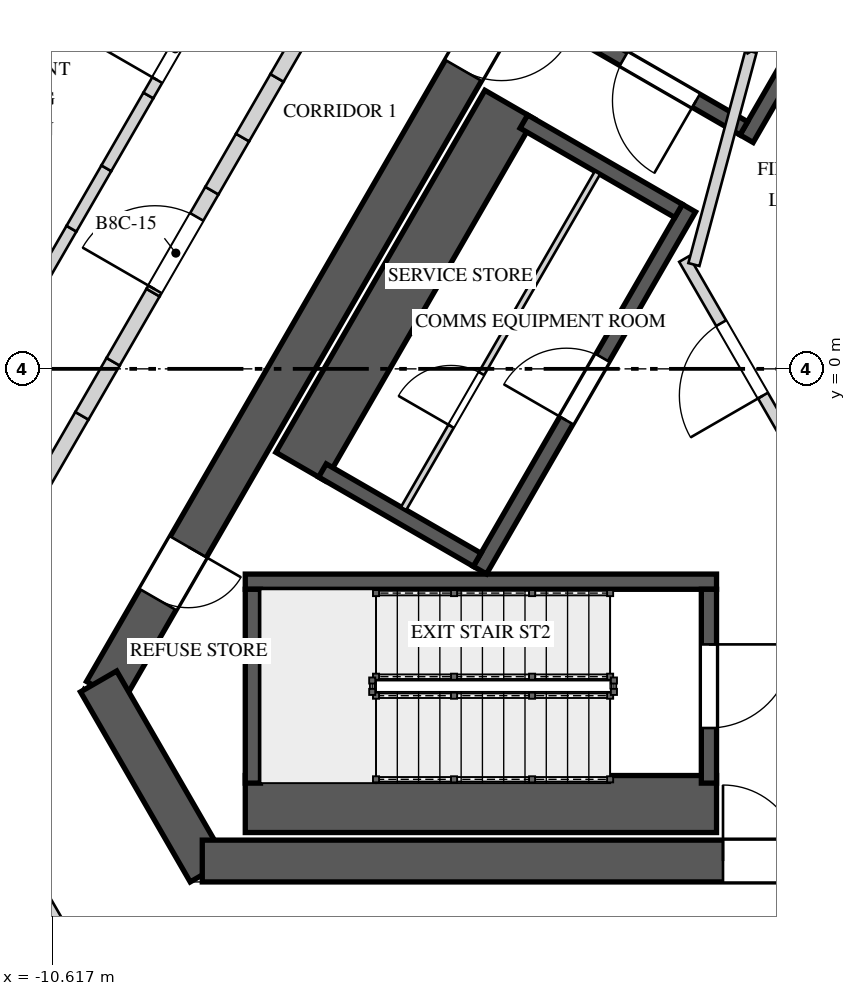
"""IFC4 building model, lengths in metres.
Left out: names, types, materials, properties, quantities, classifications, styles, units other than length and angle.
Written with IfcOpenShell. Run it as: python <this file> out.ifc"""

import sys

from ifc_helpers import new_model, si_unit, direction, frame, frame_2d, origin, place, context, subcontext, project, spatial, polyline, rectangle, outline, extrude, element, fill, save


model = new_model("IFC4")
c1 = context("Model", 3, precision=1e-05, world=origin(), true_north=direction((0.0, 1.0)))
c2 = subcontext(c1, "Body", "Model", "MODEL_VIEW")
j1 = project(units=[si_unit("LENGTHUNIT", "METRE"), si_unit("PLANEANGLEUNIT", "RADIAN")], contexts=[c1])
p1 = place(None, origin())
s1 = spatial("IfcSite", under=j1, at=p1, CompositionType="ELEMENT")
p2 = place(p1, origin())
s2 = spatial("IfcBuilding", under=s1, at=p2, CompositionType="ELEMENT")
p3 = place(p2, frame((0.0, 0.0, 344.4)))
s3 = spatial("IfcBuildingStorey", under=s2, at=p3, CompositionType="ELEMENT", Elevation=344.4)
p4 = place(p3, frame((-1.285, 10.725, 0.0), z_axis=(0.0, 0.0, 1.0), x_axis=(-0.499994590896, -0.86602852671, 0.0)))
e1 = element("IfcWall", 1, at=p4, inside=s3, PredefinedType="SHEAR", context=c2, shape_type="SweptSolid", body=[
    extrude(rectangle(XDim=17.292, YDim=0.55, at=frame_2d((8.646, 0.0))), origin(), (0.0, 0.0, 1.0), 4.0),
])
p5 = place(p4, frame((6.851, 0.0, 0.0)))
e2 = element("IfcOpeningElement", 2, at=p5, cuts=e1, PredefinedType="OPENING", context=c2, shape_type="SweptSolid", body=[
    extrude(rectangle(XDim=1.0, YDim=2.4, at=frame_2d((0.5, 1.2))), frame((0.0, 0.285, 0.0), z_axis=(0.0, -1.0, 0.0), x_axis=(1.0, 0.0, 0.0)), (0.0, 0.0, 1.0), 0.57),
])
p6 = place(p4, frame((15.089, 0.0, 0.0)))
e3 = element("IfcOpeningElement", 3, at=p6, cuts=e1, PredefinedType="OPENING", context=c2, shape_type="SweptSolid", body=[
    extrude(rectangle(XDim=0.8, YDim=2.1, at=frame_2d((0.4, 1.05))), frame((0.0, 0.285, 0.0), z_axis=(0.0, -1.0, 0.0), x_axis=(1.0, 0.0, 0.0)), (0.0, 0.0, 1.0), 0.57),
])
p7 = place(p3, frame((-10.01, -4.113, 0.0), z_axis=(0.0, 0.0, 1.0), x_axis=(0.499995765644, -0.866027848477, 0.0)))
e4 = element("IfcWall", 4, at=p7, inside=s3, PredefinedType="SHEAR", context=c2, shape_type="SweptSolid", body=[
    extrude(rectangle(XDim=2.887, YDim=0.55, at=frame_2d((1.443, 0.0))), origin(), (0.0, 0.0, 1.0), 4.0),
])
p8 = place(p3, frame((-8.646, -6.475, 0.0), z_axis=(0.0, 0.0, 1.0), x_axis=(1.0, 0.0, 0.0)))
e5 = element("IfcWall", 5, at=p8, inside=s3, PredefinedType="SHEAR", context=c2, shape_type="SweptSolid", body=[
    extrude(rectangle(XDim=17.292, YDim=0.55, at=frame_2d((8.646, 0.0))), origin(), (0.0, 0.0, 1.0), 4.0),
])
p9 = place(p8, frame((6.851, 0.0, 0.0)))
e6 = element("IfcOpeningElement", 6, at=p9, cuts=e5, PredefinedType="OPENING", context=c2, shape_type="SweptSolid", body=[
    extrude(rectangle(XDim=1.0, YDim=2.4, at=frame_2d((0.5, 1.2))), frame((0.0, 0.285, 0.0), z_axis=(0.0, -1.0, 0.0), x_axis=(1.0, 0.0, 0.0)), (0.0, 0.0, 1.0), 0.57),
])
p10 = place(p8, frame((15.089, 0.0, 0.0)))
e7 = element("IfcOpeningElement", 7, at=p10, cuts=e5, PredefinedType="OPENING", context=c2, shape_type="SweptSolid", body=[
    extrude(rectangle(XDim=0.8, YDim=2.1, at=frame_2d((0.4, 1.05))), frame((0.0, 0.285, 0.0), z_axis=(0.0, -1.0, 0.0), x_axis=(1.0, 0.0, 0.0)), (0.0, 0.0, 1.0), 0.57),
])
p11 = place(p3, frame((-13.093, -6.868, 0.0), z_axis=(0.0, 0.0, 1.0), x_axis=(0.669136224502, -0.74313976684, 0.0)))
e8 = element("IfcWall", 8, at=p11, inside=s3, PredefinedType="SOLIDWALL", context=c2, shape_type="SweptSolid", body=[
    extrude(rectangle(XDim=7.314, YDim=0.45, at=frame_2d((3.657, 0.0))), origin(), (0.0, 0.0, 1.0), 3.3),
])
p12 = place(p11, frame((0.161, 0.0, 0.4)))
e9 = element("IfcOpeningElement", 9, at=p12, cuts=e8, PredefinedType="OPENING", context=c2, shape_type="SweptSolid", body=[
    extrude(rectangle(XDim=1.95, YDim=2.75, at=frame_2d((0.975, 1.375))), frame((0.0, 0.235, 0.0), z_axis=(0.0, -1.0, 0.0), x_axis=(1.0, 0.0, 0.0)), (0.0, 0.0, 1.0), 0.47),
])
p13 = place(p11, frame((2.682, 0.0, 0.4)))
e10 = element("IfcOpeningElement", 10, at=p13, cuts=e8, PredefinedType="OPENING", context=c2, shape_type="SweptSolid", body=[
    extrude(rectangle(XDim=1.95, YDim=2.75, at=frame_2d((0.975, 1.375))), frame((0.0, 0.235, 0.0), z_axis=(0.0, -1.0, 0.0), x_axis=(1.0, 0.0, 0.0)), (0.0, 0.0, 1.0), 0.47),
])
p14 = place(p11, frame((5.203, 0.0, 0.4)))
e11 = element("IfcOpeningElement", 11, at=p14, cuts=e8, PredefinedType="OPENING", context=c2, shape_type="SweptSolid", body=[
    extrude(rectangle(XDim=1.95, YDim=2.75, at=frame_2d((0.975, 1.375))), frame((0.0, 0.235, 0.0), z_axis=(0.0, -1.0, 0.0), x_axis=(1.0, 0.0, 0.0)), (0.0, 0.0, 1.0), 0.47),
])
p15 = place(p3, frame((1.615, 8.397, 0.0), z_axis=(0.0, 0.0, 1.0), x_axis=(-0.500009909098, -0.866019682689, 0.0)))
e12 = element("IfcWall", 12, at=p15, inside=s3, PredefinedType="SOLIDWALL", context=c2, shape_type="SweptSolid", body=[
    extrude(rectangle(XDim=6.2, YDim=0.2, at=frame_2d((3.1, 0.0))), origin(), (0.0, 0.0, 1.0), 3.65),
])
p16 = place(p3, frame((-1.521, 3.165, 0.0), z_axis=(0.0, 0.0, 1.0), x_axis=(-0.866030925526, 0.499990435942, 0.0)))
e13 = element("IfcWall", 13, at=p16, inside=s3, PredefinedType="SOLIDWALL", context=c2, shape_type="SweptSolid", body=[
    extrude(rectangle(XDim=2.55, YDim=0.2, at=frame_2d((1.275, 0.0))), origin(), (0.0, 0.0, 1.0), 3.65),
])
p17 = place(p16, frame((0.725, 0.0, 0.0)))
e14 = element("IfcOpeningElement", 14, at=p17, cuts=e13, PredefinedType="OPENING", context=c2, shape_type="SweptSolid", body=[
    extrude(rectangle(XDim=1.1, YDim=2.4, at=frame_2d((0.55, 1.2))), frame((0.0, 0.11, 0.0), z_axis=(0.0, -1.0, 0.0), x_axis=(1.0, 0.0, 0.0)), (0.0, 0.0, 1.0), 0.22),
])
p18 = place(p3, frame((-8.08, -5.725, 0.0), z_axis=(0.0, 0.0, 1.0), x_axis=(1.0, 0.0, 0.0)))
e15 = element("IfcWall", 15, at=p18, inside=s3, PredefinedType="SOLIDWALL", context=c2, shape_type="SweptSolid", body=[
    extrude(rectangle(XDim=6.2, YDim=0.75, at=frame_2d((3.1, 0.0))), origin(), (0.0, 0.0, 1.0), 3.65),
])
p19 = place(p3, frame((-8.08, -2.8, 0.0), z_axis=(0.0, 0.0, 1.0), x_axis=(1.0, 0.0, 0.0)))
e16 = element("IfcWall", 16, at=p19, inside=s3, PredefinedType="SOLIDWALL", context=c2, shape_type="SweptSolid", body=[
    extrude(rectangle(XDim=6.2, YDim=0.2, at=frame_2d((3.1, 0.0))), origin(), (0.0, 0.0, 1.0), 3.65),
])
p20 = place(p3, frame((-7.98, -2.9, 0.0), z_axis=(0.0, 0.0, 1.0), x_axis=(0.0, -1.0, 0.0)))
e17 = element("IfcWall", 17, at=p20, inside=s3, PredefinedType="SOLIDWALL", context=c2, shape_type="SweptSolid", body=[
    extrude(rectangle(XDim=2.55, YDim=0.2, at=frame_2d((1.275, 0.0))), origin(), (0.0, 0.0, 1.0), 3.65),
])
p21 = place(p3, frame((-1.98, -2.9, 0.0), z_axis=(0.0, 0.0, 1.0), x_axis=(0.0, -1.0, 0.0)))
e18 = element("IfcWall", 18, at=p21, inside=s3, PredefinedType="SOLIDWALL", context=c2, shape_type="SweptSolid", body=[
    extrude(rectangle(XDim=2.55, YDim=0.2, at=frame_2d((1.275, 0.0))), origin(), (0.0, 0.0, 1.0), 3.65),
])
p22 = place(p21, frame((0.725, 0.0, 0.0)))
e19 = element("IfcOpeningElement", 19, at=p22, cuts=e18, PredefinedType="OPENING", context=c2, shape_type="SweptSolid", body=[
    extrude(rectangle(XDim=1.1, YDim=2.4, at=frame_2d((0.55, 1.2))), frame((0.0, 0.11, 0.0), z_axis=(0.0, -1.0, 0.0), x_axis=(1.0, 0.0, 0.0)), (0.0, 0.0, 1.0), 0.22),
])
p23 = place(p3, frame((-4.993, -2.648, 0.0), z_axis=(0.0, 0.0, 1.0), x_axis=(0.499996545922, 0.866027397988, 0.0)))
e20 = element("IfcWall", 20, at=p23, inside=s3, PredefinedType="SOLIDWALL", context=c2, shape_type="SweptSolid", body=[
    extrude(rectangle(XDim=5.5, YDim=0.2, at=frame_2d((2.75, 0.0))), origin(), (0.0, 0.0, 1.0), 3.65),
])
p24 = place(p23, frame((2.275, 0.0, 0.0)))
e21 = element("IfcOpeningElement", 21, at=p24, cuts=e20, PredefinedType="OPENING", context=c2, shape_type="SweptSolid", body=[
    extrude(rectangle(XDim=0.95, YDim=2.4, at=frame_2d((0.475, 1.2))), frame((0.0, 0.11, 0.0), z_axis=(0.0, -1.0, 0.0), x_axis=(1.0, 0.0, 0.0)), (0.0, 0.0, 1.0), 0.22),
])
p25 = place(p3, frame((-4.603, 3.477, 0.0), z_axis=(0.0, 0.0, 1.0), x_axis=(-0.500015767406, -0.866016300277, 0.0)))
e22 = element("IfcWall", 22, at=p25, inside=s3, PredefinedType="SOLIDWALL", context=c2, shape_type="SweptSolid", body=[
    extrude(rectangle(XDim=5.5, YDim=0.75, at=frame_2d((2.75, 0.0))), origin(), (0.0, 0.0, 1.0), 3.65),
])
p26 = place(p3, frame((-2.38, 2.078, 0.0), z_axis=(0.0, 0.0, 1.0), x_axis=(-0.866061024631, 0.499938297808, 0.0)))
e23 = element("IfcWall", 23, at=p26, inside=s3, PredefinedType="SOLIDWALL", context=c2, shape_type="SweptSolid", body=[
    extrude(rectangle(XDim=2.35, YDim=0.2, at=frame_2d((1.175, 0.0))), origin(), (0.0, 0.0, 1.0), 3.65),
])
p27 = place(p3, frame((-5.03, -2.512, 0.0), z_axis=(0.0, 0.0, 1.0), x_axis=(-0.866016039709, 0.500016218704, 0.0)))
e24 = element("IfcWall", 24, at=p27, inside=s3, PredefinedType="SOLIDWALL", context=c2, shape_type="SweptSolid", body=[
    extrude(rectangle(XDim=2.35, YDim=0.2, at=frame_2d((1.175, 0.0))), origin(), (0.0, 0.0, 1.0), 3.65),
])
p28 = place(p3, frame((-5.997, -1.838, 0.0), z_axis=(0.0, 0.0, 1.0), x_axis=(0.500005610874, 0.86602216432, 0.0)))
e25 = element("IfcWall", 25, at=p28, inside=s3, PredefinedType="PARTITIONING", context=c2, shape_type="SweptSolid", body=[
    extrude(rectangle(XDim=5.1, YDim=0.08, at=frame_2d((2.55, 0.0))), origin(), (0.0, 0.0, 1.0), 3.65),
])
p29 = place(p28, frame((1.25, 0.0, 0.0)))
e26 = element("IfcOpeningElement", 26, at=p29, cuts=e25, PredefinedType="OPENING", context=c2, shape_type="SweptSolid", body=[
    extrude(rectangle(XDim=0.8, YDim=2.1, at=frame_2d((0.4, 1.05))), frame((0.0, 0.05, 0.0), z_axis=(0.0, -1.0, 0.0), x_axis=(1.0, 0.0, 0.0)), (0.0, 0.0, 1.0), 0.1),
])
p30 = place(p3, frame((-0.744, -1.261, 0.0), z_axis=(0.0, 0.0, 1.0), x_axis=(-0.500004234368, 0.866022959057, 0.0)))
e27 = element("IfcWall", 27, at=p30, inside=s3, PredefinedType="PARTITIONING", context=c2, shape_type="SweptSolid", body=[
    extrude(rectangle(XDim=3.125, YDim=0.15, at=frame_2d((1.562, 0.0))), origin(), (0.0, 0.0, 1.0), 3.65),
])
p31 = place(p30, frame((1.05, 0.0, 0.0)))
e28 = element("IfcOpeningElement", 28, at=p31, cuts=e27, PredefinedType="OPENING", context=c2, shape_type="SweptSolid", body=[
    extrude(rectangle(XDim=1.1, YDim=2.4, at=frame_2d((0.55, 1.2))), frame((0.0, 0.085, 0.0), z_axis=(0.0, -1.0, 0.0), x_axis=(1.0, 0.0, 0.0)), (0.0, 0.0, 1.0), 0.17),
])
p32 = place(p3, frame((-2.178, 1.372, 0.0), z_axis=(0.0, 0.0, 1.0), x_axis=(0.258808958833, 0.96592852884, 0.0)))
e29 = element("IfcWall", 29, at=p32, inside=s3, PredefinedType="PARTITIONING", context=c2, shape_type="SweptSolid", body=[
    extrude(rectangle(XDim=2.903, YDim=0.15, at=frame_2d((1.451, 0.0))), origin(), (0.0, 0.0, 1.0), 3.65),
])
p33 = place(p3, frame((-1.51, 4.215, 0.0), z_axis=(0.0, 0.0, 1.0), x_axis=(0.866085525409, 0.49989585183, 0.0)))
e30 = element("IfcWall", 30, at=p33, inside=s3, PredefinedType="PARTITIONING", context=c2, shape_type="SweptSolid", body=[
    extrude(rectangle(XDim=1.3, YDim=0.15, at=frame_2d((0.65, 0.0))), origin(), (0.0, 0.0, 1.0), 3.65),
])
p34 = place(p3, frame((-11.409, 0.039, 0.0), z_axis=(0.0, 0.0, 1.0), x_axis=(0.499969202016, 0.866043184279, 0.0)))
e31 = element("IfcWall", 31, at=p34, inside=s3, PredefinedType="PARTITIONING", context=c2, shape_type="SweptSolid", body=[
    extrude(rectangle(XDim=2.084, YDim=0.15, at=frame_2d((1.042, 0.0))), origin(), (0.0, 0.0, 1.0), 3.65),
])
p35 = place(p3, frame((-10.367, 1.844, 0.0), z_axis=(0.0, 0.0, 1.0), x_axis=(0.499945096919, 0.866057099772, 0.0)))
e32 = element("IfcWall", 32, at=p35, inside=s3, PredefinedType="PARTITIONING", context=c2, shape_type="SweptSolid", body=[
    extrude(rectangle(XDim=0.917, YDim=0.15, at=frame_2d((0.459, 0.0))), origin(), (0.0, 0.0, 1.0), 2.55),
])
p36 = place(p3, frame((-9.908, 2.639, 0.0), z_axis=(0.0, 0.0, 1.0), x_axis=(0.500009088543, 0.866020156448, 0.0)))
e33 = element("IfcWall", 33, at=p36, inside=s3, PredefinedType="PARTITIONING", context=c2, shape_type="SweptSolid", body=[
    extrude(rectangle(XDim=1.106, YDim=0.15, at=frame_2d((0.553, 0.0))), origin(), (0.0, 0.0, 1.0), 3.65),
])
p37 = place(p3, frame((-9.355, 3.597, 0.0), z_axis=(0.0, 0.0, 1.0), x_axis=(0.499990780478, 0.866030726613, 0.0)))
e34 = element("IfcWall", 34, at=p37, inside=s3, PredefinedType="PARTITIONING", context=c2, shape_type="SweptSolid", body=[
    extrude(outline(polyline([(0.0, 0.0), (1.234, 0.0), (1.234, 3.65), (0.881, 3.65), (0.881, 2.55), (0.0, 2.55), (0.0, 0.0)])), frame((0.0, 0.075, 0.0), z_axis=(0.0, -1.0, 0.0), x_axis=(1.0, 0.0, 0.0)), (0.0, 0.0, 1.0), 0.15),
])
p38 = place(p37, frame((0.234, 0.0, 0.0)))
e35 = element("IfcOpeningElement", 35, at=p38, cuts=e34, PredefinedType="OPENING", context=c2, shape_type="SweptSolid", body=[
    extrude(rectangle(XDim=0.95, YDim=2.4, at=frame_2d((0.475, 1.2))), frame((0.0, 0.085, 0.0), z_axis=(0.0, -1.0, 0.0), x_axis=(1.0, 0.0, 0.0)), (0.0, 0.0, 1.0), 0.17),
])
p39 = place(p3, frame((-9.844, -8.55, 0.0), z_axis=(0.0, 0.0, 1.0), x_axis=(-0.500003959331, 0.866023117852, 0.0)))
e36 = element("IfcWall", 36, at=p39, inside=s3, PredefinedType="SOLIDWALL", context=c2, shape_type="SweptSolid", body=[
    extrude(rectangle(XDim=3.003, YDim=0.2, at=frame_2d((1.501, 0.0))), origin(), (0.0, 0.0, 1.0), 3.65),
])
p40 = place(p3, frame((-12.326, -4.25, 0.0), z_axis=(0.0, 0.0, 1.0), x_axis=(0.499982771656, 0.866035350345, 0.0)))
e37 = element("IfcWall", 37, at=p40, inside=s3, PredefinedType="SOLIDWALL", context=c2, shape_type="SweptSolid", body=[
    extrude(rectangle(XDim=4.195, YDim=0.2, at=frame_2d((2.097, 0.0))), origin(), (0.0, 0.0, 1.0), 3.65),
])
p41 = place(p3, frame((-10.229, -0.617, 0.0), z_axis=(0.0, 0.0, 1.0), x_axis=(0.5001686003, 0.865928040471, 0.0)))
e38 = element("IfcWall", 38, at=p41, inside=s3, PredefinedType="SOLIDWALL", context=c2, shape_type="SweptSolid", body=[
    extrude(rectangle(XDim=0.821, YDim=0.2, at=frame_2d((0.411, 0.0))), origin(), (0.0, 0.0, 1.0), 2.95),
])
p42 = place(p3, frame((-9.819, 0.094, 0.0), z_axis=(0.0, 0.0, 1.0), x_axis=(0.499890179513, 0.866088799389, 0.0)))
e39 = element("IfcWall", 39, at=p42, inside=s3, PredefinedType="SOLIDWALL", context=c2, shape_type="SweptSolid", body=[
    extrude(rectangle(XDim=1.05, YDim=0.2, at=frame_2d((0.525, 0.0))), origin(), (0.0, 0.0, 1.0), 3.65),
])
p43 = place(p3, frame((-9.294, 1.003, 0.0), z_axis=(0.0, 0.0, 1.0), x_axis=(0.500054401891, 0.86599399256, 0.0)))
e40 = element("IfcWall", 40, at=p43, inside=s3, PredefinedType="SOLIDWALL", context=c2, shape_type="SweptSolid", body=[
    extrude(outline(polyline([(0.0, 0.0), (1.549, 0.0), (1.549, 2.55), (0.605, 2.55), (0.605, 3.65), (0.0, 3.65), (0.0, 0.0)])), frame((0.0, 0.1, 0.0), z_axis=(0.0, -1.0, 0.0), x_axis=(1.0, 0.0, 0.0)), (0.0, 0.0, 1.0), 0.2),
])
p44 = place(p43, frame((0.05, 0.0, 0.0)))
e41 = element("IfcOpeningElement", 41, at=p44, cuts=e40, PredefinedType="OPENING", context=c2, shape_type="SweptSolid", body=[
    extrude(rectangle(XDim=1.1, YDim=2.4, at=frame_2d((0.55, 1.2))), frame((0.0, 0.11, 0.0), z_axis=(0.0, -1.0, 0.0), x_axis=(1.0, 0.0, 0.0)), (0.0, 0.0, 1.0), 0.22),
])
p45 = place(p3, frame((-8.519, 2.344, 0.0), z_axis=(0.0, 0.0, 1.0), x_axis=(0.499914554297, 0.866074730264, 0.0)))
e42 = element("IfcWall", 42, at=p45, inside=s3, PredefinedType="SOLIDWALL", context=c2, shape_type="SweptSolid", body=[
    extrude(rectangle(XDim=0.807, YDim=0.2, at=frame_2d((0.403, 0.0))), origin(), (0.0, 0.0, 1.0), 3.65),
])
p46 = place(p3, frame((-8.116, 3.043, 0.0), z_axis=(0.0, 0.0, 1.0), x_axis=(0.499994660107, 0.866028486751, 0.0)))
e43 = element("IfcWall", 43, at=p46, inside=s3, PredefinedType="SOLIDWALL", context=c2, shape_type="SweptSolid", body=[
    extrude(rectangle(XDim=0.906, YDim=0.2, at=frame_2d((0.453, 0.0))), origin(), (0.0, 0.0, 1.0), 2.55),
])
p47 = place(p3, frame((-7.663, 3.828, 0.0), z_axis=(0.0, 0.0, 1.0), x_axis=(0.499955681623, 0.866050989499, 0.0)))
e44 = element("IfcWall", 44, at=p47, inside=s3, PredefinedType="SOLIDWALL", context=c2, shape_type="SweptSolid", body=[
    extrude(rectangle(XDim=1.238, YDim=0.2, at=frame_2d((0.619, 0.0))), origin(), (0.0, 0.0, 1.0), 3.65),
])
p48 = place(p17, origin())
e45 = element("IfcDoor", 45, at=p48, inside=s3, OperationType="SINGLE_SWING_RIGHT", PredefinedType="DOOR", context=c2, shape_type="SweptSolid", body=[
    extrude(rectangle(XDim=1.1, YDim=2.4, at=frame_2d((0.55, 1.2))), frame((0.0, 0.025, 0.0), z_axis=(0.0, -1.0, 0.0), x_axis=(1.0, 0.0, 0.0)), (0.0, 0.0, 1.0), 0.05),
])
fill(e14, e45)
p49 = place(p22, origin())
e46 = element("IfcDoor", 46, at=p49, inside=s3, OperationType="SINGLE_SWING_LEFT", PredefinedType="DOOR", context=c2, shape_type="SweptSolid", body=[
    extrude(rectangle(XDim=1.1, YDim=2.4, at=frame_2d((0.55, 1.2))), frame((0.0, 0.025, 0.0), z_axis=(0.0, -1.0, 0.0), x_axis=(1.0, 0.0, 0.0)), (0.0, 0.0, 1.0), 0.05),
])
fill(e19, e46)
p50 = place(p24, origin())
e47 = element("IfcDoor", 47, at=p50, inside=s3, OperationType="SINGLE_SWING_LEFT", PredefinedType="DOOR", context=c2, shape_type="SweptSolid", body=[
    extrude(rectangle(XDim=0.95, YDim=2.4, at=frame_2d((0.475, 1.2))), frame((0.0, 0.025, 0.0), z_axis=(0.0, -1.0, 0.0), x_axis=(1.0, 0.0, 0.0)), (0.0, 0.0, 1.0), 0.05),
])
fill(e21, e47)
p51 = place(p29, origin())
e48 = element("IfcDoor", 48, at=p51, inside=s3, OperationType="SINGLE_SWING_RIGHT", PredefinedType="DOOR", context=c2, shape_type="SweptSolid", body=[
    extrude(rectangle(XDim=0.8, YDim=2.1, at=frame_2d((0.4, 1.05))), frame((0.0, 0.025, 0.0), z_axis=(0.0, -1.0, 0.0), x_axis=(1.0, 0.0, 0.0)), (0.0, 0.0, 1.0), 0.05),
])
fill(e26, e48)
p52 = place(p31, origin())
e49 = element("IfcDoor", 49, at=p52, inside=s3, OperationType="SINGLE_SWING_LEFT", PredefinedType="DOOR", context=c2, shape_type="SweptSolid", body=[
    extrude(rectangle(XDim=1.1, YDim=2.4, at=frame_2d((0.55, 1.2))), frame((0.0, 0.025, 0.0), z_axis=(0.0, -1.0, 0.0), x_axis=(1.0, 0.0, 0.0)), (0.0, 0.0, 1.0), 0.05),
])
fill(e28, e49)
p53 = place(p5, origin())
e50 = element("IfcDoor", 50, at=p53, inside=s3, OperationType="SINGLE_SWING_RIGHT", PredefinedType="DOOR", context=c2, shape_type="SweptSolid", body=[
    extrude(rectangle(XDim=1.0, YDim=2.4, at=frame_2d((0.5, 1.2))), frame((0.0, 0.025, 0.0), z_axis=(0.0, -1.0, 0.0), x_axis=(1.0, 0.0, 0.0)), (0.0, 0.0, 1.0), 0.05),
])
fill(e2, e50)
p54 = place(p9, origin())
e51 = element("IfcDoor", 51, at=p54, inside=s3, OperationType="SINGLE_SWING_LEFT", PredefinedType="DOOR", context=c2, shape_type="SweptSolid", body=[
    extrude(rectangle(XDim=1.0, YDim=2.4, at=frame_2d((0.5, 1.2))), frame((0.0, 0.025, 0.0), z_axis=(0.0, -1.0, 0.0), x_axis=(1.0, 0.0, 0.0)), (0.0, 0.0, 1.0), 0.05),
])
fill(e6, e51)
p55 = place(p6, origin())
e52 = element("IfcDoor", 52, at=p55, inside=s3, OperationType="SINGLE_SWING_LEFT", PredefinedType="DOOR", context=c2, shape_type="SweptSolid", body=[
    extrude(rectangle(XDim=0.8, YDim=2.1, at=frame_2d((0.4, 1.05))), frame((0.0, 0.025, 0.0), z_axis=(0.0, -1.0, 0.0), x_axis=(1.0, 0.0, 0.0)), (0.0, 0.0, 1.0), 0.05),
])
fill(e3, e52)
p56 = place(p38, origin())
e53 = element("IfcDoor", 53, at=p56, inside=s3, OperationType="SINGLE_SWING_LEFT", PredefinedType="DOOR", context=c2, shape_type="SweptSolid", body=[
    extrude(rectangle(XDim=0.95, YDim=2.4, at=frame_2d((0.475, 1.2))), frame((0.0, 0.025, 0.0), z_axis=(0.0, -1.0, 0.0), x_axis=(1.0, 0.0, 0.0)), (0.0, 0.0, 1.0), 0.05),
])
fill(e35, e53)
p57 = place(p44, origin())
e54 = element("IfcDoor", 54, at=p57, inside=s3, OperationType="SINGLE_SWING_LEFT", PredefinedType="DOOR", context=c2, shape_type="SweptSolid", body=[
    extrude(rectangle(XDim=1.1, YDim=2.4, at=frame_2d((0.55, 1.2))), frame((0.0, 0.025, 0.0), z_axis=(0.0, -1.0, 0.0), x_axis=(1.0, 0.0, 0.0)), (0.0, 0.0, 1.0), 0.05),
])
fill(e41, e54)
save(model, sys.argv[1])
